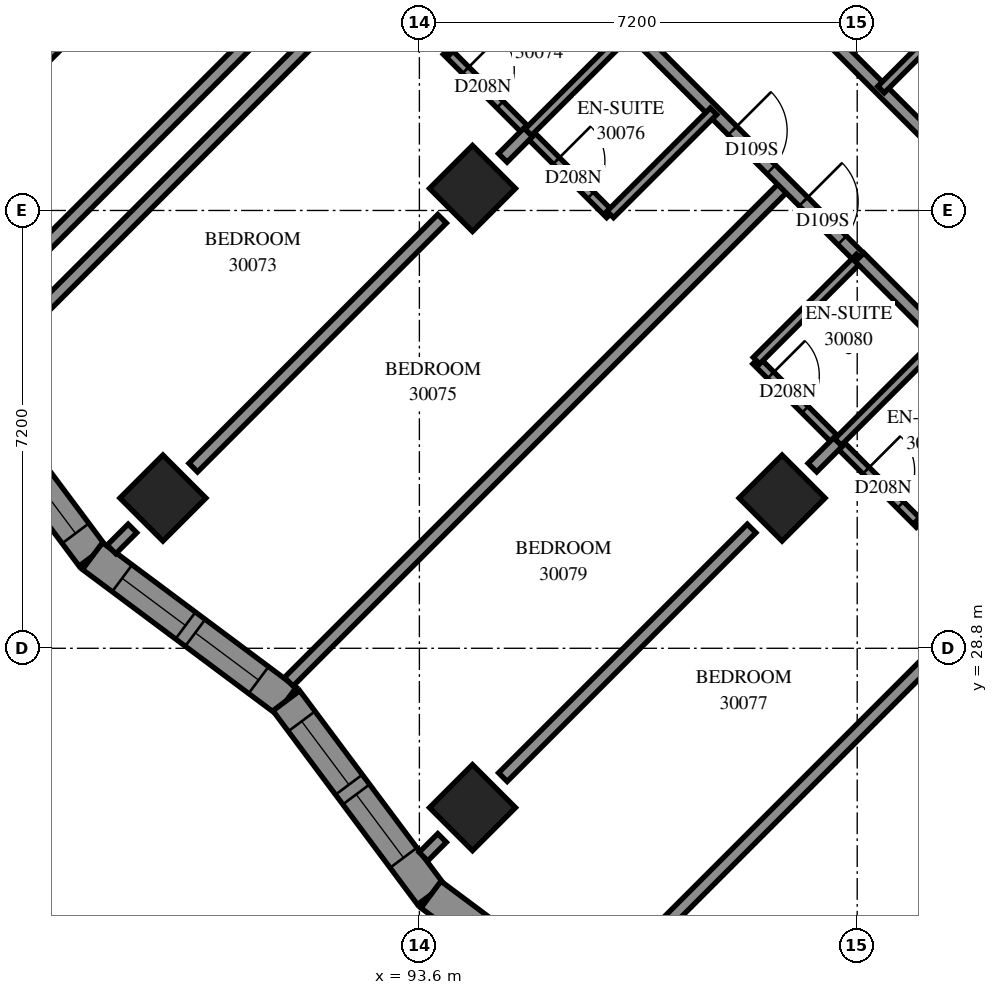
"""IFC4 building model, lengths in metres.
Left out: names, types, materials, properties, quantities, classifications, styles, units other than length and angle.
Written with IfcOpenShell. Run it as: python <this file> out.ifc"""

import sys

from ifc_helpers import new_model, si_unit, direction, frame, frame_2d, origin, origin_2d, place, context, subcontext, project, spatial, polyline, rectangle, outline, extrude, element, fill, save


model = new_model("IFC4")
c1 = context("Model", 3, precision=1e-05, world=origin(), true_north=direction((0.0, 1.0)))
c2 = subcontext(c1, "Body", "Model", "MODEL_VIEW")
j1 = project(units=[si_unit("LENGTHUNIT", "METRE"), si_unit("PLANEANGLEUNIT", "RADIAN")], contexts=[c1])
p1 = place(None, origin())
s1 = spatial("IfcSite", under=j1, at=p1, CompositionType="ELEMENT")
p2 = place(p1, origin())
s2 = spatial("IfcBuilding", under=s1, at=p2, CompositionType="ELEMENT")
p3 = place(p2, frame((0.0, 0.0, 111.8)))
s3 = spatial("IfcBuildingStorey", under=s2, at=p3, CompositionType="ELEMENT", Elevation=111.8)
for number, where, z_axis, x_axis in (
    (1, (94.474, 36.362, 0.0), (0.0, 0.0, 1.0), (0.707, -0.707, 0.0)),
    (2, (89.382, 31.271, 0.0), (0.0, 0.0, 1.0), (0.707, -0.707, 0.0)),
    (3, (99.565, 31.271, 0.0), (0.0, 0.0, 1.0), (0.707, -0.707, 0.0)),
    (4, (94.474, 26.18, 0.0), (0.0, 0.0, 1.0), (0.707, -0.707, 0.0)),
):
    element("IfcColumn", number, at=place(p3, frame(where, z_axis=z_axis, x_axis=x_axis)), inside=s3, PredefinedType="COLUMN", context=c2, shape_type="SweptSolid", body=[
        extrude(rectangle(XDim=1.0, YDim=1.0, at=origin_2d()), origin(), (0.0, 0.0, 1.0), 3.1),
    ])
p4 = place(p3, frame((87.12, 38.625, -0.3), z_axis=(0.0, 0.0, 1.0), x_axis=(0.7071067812, 0.7071067812, 0.0)))
e5 = element("IfcWall", 5, at=p4, inside=s3, PredefinedType="SHEAR", context=c2, shape_type="SweptSolid", body=[
    extrude(rectangle(XDim=14.4, YDim=0.8, at=frame_2d((7.2, 0.0))), origin(), (0.0, 0.0, 1.0), 2.7),
])
p5 = place(p4, frame((4.55, 0.0, 0.3)))
e6 = element("IfcOpeningElement", 6, at=p5, cuts=e5, PredefinedType="OPENING", context=c2, shape_type="SweptSolid", body=[
    extrude(rectangle(XDim=1.1, YDim=2.1, at=frame_2d((0.55, 1.05))), frame((0.0, 0.41, 0.0), z_axis=(0.0, -1.0, 0.0), x_axis=(1.0, 0.0, 0.0)), (0.0, 0.0, 1.0), 0.82),
])
p6 = place(p4, frame((11.35, 0.0, 0.3)))
e7 = element("IfcOpeningElement", 7, at=p6, cuts=e5, PredefinedType="OPENING", context=c2, shape_type="SweptSolid", body=[
    extrude(rectangle(XDim=1.1, YDim=2.1, at=frame_2d((0.55, 1.05))), frame((0.0, 0.41, 0.0), z_axis=(0.0, -1.0, 0.0), x_axis=(1.0, 0.0, 0.0)), (0.0, 0.0, 1.0), 0.82),
])
p7 = place(p3, frame((85.845, 33.504, 0.0), z_axis=(0.0, 0.0, 1.0), x_axis=(0.5980713977, -0.801442826, 0.0)))
e8 = element("IfcWall", 8, at=p7, inside=s3, PredefinedType="SOLIDWALL", context=c2, shape_type="SweptSolid", body=[
    extrude(outline(polyline([(0.04, -0.275), (4.017, -0.275), (3.937, 0.275), (-0.04, 0.275), (0.04, -0.275)])), origin(), (0.0, 0.0, 1.0), 3.1),
])
p8 = place(p7, frame((0.711, 0.0, 0.5)))
e9 = element("IfcOpeningElement", 9, at=p8, cuts=e8, PredefinedType="OPENING", context=c2, shape_type="SweptSolid", body=[
    extrude(rectangle(XDim=1.3, YDim=2.45, at=frame_2d((0.65, 1.225))), frame((0.0, 0.285, 0.0), z_axis=(0.0, -1.0, 0.0), x_axis=(1.0, 0.0, 0.0)), (0.0, 0.0, 1.0), 0.57),
])
p9 = place(p7, frame((2.211, 0.0, 0.5)))
e10 = element("IfcOpeningElement", 10, at=p9, cuts=e8, PredefinedType="OPENING", context=c2, shape_type="SweptSolid", body=[
    extrude(rectangle(XDim=1.3, YDim=2.45, at=frame_2d((0.65, 1.225))), frame((0.0, 0.285, 0.0), z_axis=(0.0, -1.0, 0.0), x_axis=(1.0, 0.0, 0.0)), (0.0, 0.0, 1.0), 0.57),
])
p10 = place(p3, frame((88.224, 30.316, 0.0), z_axis=(0.0, 0.0, 1.0), x_axis=(0.8014458841, -0.5980672997, 0.0)))
e11 = element("IfcWall", 11, at=p10, inside=s3, PredefinedType="SOLIDWALL", context=c2, shape_type="SweptSolid", body=[
    extrude(outline(polyline([(-0.04, -0.275), (3.937, -0.275), (4.017, 0.275), (0.04, 0.275), (-0.04, -0.275)])), origin(), (0.0, 0.0, 1.0), 3.1),
])
p11 = place(p10, frame((0.609, 0.0, 0.5)))
e12 = element("IfcOpeningElement", 12, at=p11, cuts=e11, PredefinedType="OPENING", context=c2, shape_type="SweptSolid", body=[
    extrude(rectangle(XDim=1.3, YDim=2.45, at=frame_2d((0.65, 1.225))), frame((0.0, 0.285, 0.0), z_axis=(0.0, -1.0, 0.0), x_axis=(1.0, 0.0, 0.0)), (0.0, 0.0, 1.0), 0.57),
])
p12 = place(p10, frame((2.109, 0.0, 0.5)))
e13 = element("IfcOpeningElement", 13, at=p12, cuts=e11, PredefinedType="OPENING", context=c2, shape_type="SweptSolid", body=[
    extrude(rectangle(XDim=1.3, YDim=2.45, at=frame_2d((0.65, 1.225))), frame((0.0, 0.285, 0.0), z_axis=(0.0, -1.0, 0.0), x_axis=(1.0, 0.0, 0.0)), (0.0, 0.0, 1.0), 0.57),
])
p13 = place(p3, frame((91.412, 27.937, 0.0), z_axis=(0.0, 0.0, 1.0), x_axis=(0.5980672997, -0.8014458841, 0.0)))
e14 = element("IfcWall", 14, at=p13, inside=s3, PredefinedType="SOLIDWALL", context=c2, shape_type="SweptSolid", body=[
    extrude(outline(polyline([(0.04, -0.275), (4.017, -0.275), (3.937, 0.275), (-0.04, 0.275), (0.04, -0.275)])), origin(), (0.0, 0.0, 1.0), 3.1),
])
p14 = place(p13, frame((0.422, 0.0, 0.5)))
e15 = element("IfcOpeningElement", 15, at=p14, cuts=e14, PredefinedType="OPENING", context=c2, shape_type="SweptSolid", body=[
    extrude(rectangle(XDim=1.3, YDim=2.45, at=frame_2d((0.65, 1.225))), frame((0.0, 0.285, 0.0), z_axis=(0.0, -1.0, 0.0), x_axis=(1.0, 0.0, 0.0)), (0.0, 0.0, 1.0), 0.57),
])
p15 = place(p13, frame((1.922, 0.0, 0.5)))
e16 = element("IfcOpeningElement", 16, at=p15, cuts=e14, PredefinedType="OPENING", context=c2, shape_type="SweptSolid", body=[
    extrude(rectangle(XDim=1.3, YDim=2.45, at=frame_2d((0.65, 1.225))), frame((0.0, 0.285, 0.0), z_axis=(0.0, -1.0, 0.0), x_axis=(1.0, 0.0, 0.0)), (0.0, 0.0, 1.0), 0.57),
])
p16 = place(p3, frame((93.79, 24.75, 0.0), z_axis=(0.0, 0.0, 1.0), x_axis=(0.8014443864, -0.5980693066, 0.0)))
e17 = element("IfcWall", 17, at=p16, inside=s3, PredefinedType="SOLIDWALL", context=c2, shape_type="SweptSolid", body=[
    extrude(outline(polyline([(-0.04, -0.275), (3.937, -0.275), (4.059, 0.275), (0.04, 0.275), (-0.04, -0.275)])), origin(), (0.0, 0.0, 1.0), 3.1),
])
p17 = place(p16, frame((1.072, 0.0, 0.5)))
e18 = element("IfcOpeningElement", 18, at=p17, cuts=e17, PredefinedType="OPENING", context=c2, shape_type="SweptSolid", body=[
    extrude(rectangle(XDim=1.2, YDim=2.45, at=frame_2d((0.6, 1.225))), frame((0.0, 0.285, 0.0), z_axis=(0.0, -1.0, 0.0), x_axis=(1.0, 0.0, 0.0)), (0.0, 0.0, 1.0), 0.57),
])
p18 = place(p3, frame((96.474, 23.09, 0.0), z_axis=(0.0, 0.0, 1.0), x_axis=(0.7071067812, 0.7071067812, 0.0)))
e19 = element("IfcWall", 19, at=p18, inside=s3, PredefinedType="PARTITIONING", context=c2, shape_type="SweptSolid", body=[
    extrude(rectangle(XDim=11.67, YDim=0.2, at=frame_2d((5.835, 0.0))), origin(), (0.0, 0.0, 1.0), 3.1),
])
p19 = place(p3, frame((86.331, 33.312, 0.0), z_axis=(0.0, 0.0, 1.0), x_axis=(0.707102476, 0.7071110864, 0.0)))
e20 = element("IfcWall", 20, at=p19, inside=s3, PredefinedType="PARTITIONING", context=c2, shape_type="SweptSolid", body=[
    extrude(rectangle(XDim=11.614, YDim=0.2, at=frame_2d((5.807, 0.0))), origin(), (0.0, 0.0, 1.0), 3.1),
])
p20 = place(p3, frame((91.452, 28.25, 0.0), z_axis=(0.0, 0.0, 1.0), x_axis=(0.7071931897, 0.7070203621, 0.0)))
e21 = element("IfcWall", 21, at=p20, inside=s3, PredefinedType="PARTITIONING", context=c2, shape_type="SweptSolid", body=[
    extrude(rectangle(XDim=11.572, YDim=0.2, at=frame_2d((5.786, 0.0))), origin(), (0.0, 0.0, 1.0), 3.1),
])
p21 = place(p3, frame((86.835, 34.806, 0.0), z_axis=(0.0, 0.0, 1.0), x_axis=(0.7071067812, 0.7071067812, 0.0)))
e22 = element("IfcWall", 22, at=p21, inside=s3, PredefinedType="PARTITIONING", context=c2, shape_type="SweptSolid", body=[
    extrude(rectangle(XDim=10.201, YDim=0.2, at=frame_2d((5.1, 0.0))), origin(), (0.0, 0.0, 1.0), 3.1),
])
p22 = place(p21, frame((8.959, 0.0, 0.0)))
e23 = element("IfcOpeningElement", 23, at=p22, cuts=e22, PredefinedType="OPENING", context=c2, shape_type="SweptSolid", body=[
    extrude(rectangle(XDim=1.0, YDim=2.1, at=frame_2d((0.5, 1.05))), frame((0.0, 0.11, 0.0), z_axis=(0.0, -1.0, 0.0), x_axis=(1.0, 0.0, 0.0)), (0.0, 0.0, 1.0), 0.22),
])
p23 = place(p3, frame((94.047, 42.015, 0.0), z_axis=(0.0, 0.0, 1.0), x_axis=(0.7071067812, -0.7071067812, 0.0)))
e24 = element("IfcWall", 24, at=p23, inside=s3, PredefinedType="PARTITIONING", context=c2, shape_type="SweptSolid", body=[
    extrude(rectangle(XDim=9.6, YDim=0.2, at=frame_2d((4.8, 0.0))), origin(), (0.0, 0.0, 1.0), 3.1),
])
p24 = place(p23, frame((1.099, 0.0, 0.0)))
e25 = element("IfcOpeningElement", 25, at=p24, cuts=e24, PredefinedType="OPENING", context=c2, shape_type="SweptSolid", body=[
    extrude(rectangle(XDim=0.9, YDim=2.1, at=frame_2d((0.45, 1.05))), frame((0.0, 0.11, 0.0), z_axis=(0.0, -1.0, 0.0), x_axis=(1.0, 0.0, 0.0)), (0.0, 0.0, 1.0), 0.22),
])
p25 = place(p23, frame((6.649, 0.0, 0.0)))
e26 = element("IfcOpeningElement", 26, at=p25, cuts=e24, PredefinedType="OPENING", context=c2, shape_type="SweptSolid", body=[
    extrude(rectangle(XDim=0.9, YDim=2.1, at=frame_2d((0.45, 1.05))), frame((0.0, 0.11, 0.0), z_axis=(0.0, -1.0, 0.0), x_axis=(1.0, 0.0, 0.0)), (0.0, 0.0, 1.0), 0.22),
])
p26 = place(p23, frame((8.3, 0.0, 0.0)))
e27 = element("IfcOpeningElement", 27, at=p26, cuts=e24, PredefinedType="OPENING", context=c2, shape_type="SweptSolid", body=[
    extrude(rectangle(XDim=0.9, YDim=2.1, at=frame_2d((0.45, 1.05))), frame((0.0, 0.11, 0.0), z_axis=(0.0, -1.0, 0.0), x_axis=(1.0, 0.0, 0.0)), (0.0, 0.0, 1.0), 0.22),
])
p27 = place(p3, frame((96.103, 43.083, 0.0), z_axis=(0.0, 0.0, 1.0), x_axis=(0.7071067812, -0.7071067812, 0.0)))
e28 = element("IfcWall", 28, at=p27, inside=s3, PredefinedType="PARTITIONING", context=c2, shape_type="SweptSolid", body=[
    extrude(rectangle(XDim=8.491, YDim=0.2, at=frame_2d((4.245, 0.0))), origin(), (0.0, 0.0, 1.0), 3.1),
])
p28 = place(p27, frame((1.995, 0.0, 0.0)))
e29 = element("IfcOpeningElement", 29, at=p28, cuts=e28, PredefinedType="OPENING", context=c2, shape_type="SweptSolid", body=[
    extrude(rectangle(XDim=0.9, YDim=2.1, at=frame_2d((0.45, 1.05))), frame((0.0, 0.11, 0.0), z_axis=(0.0, -1.0, 0.0), x_axis=(1.0, 0.0, 0.0)), (0.0, 0.0, 1.0), 0.22),
])
p29 = place(p27, frame((4.27, 0.0, 0.0)))
e30 = element("IfcOpeningElement", 30, at=p29, cuts=e28, PredefinedType="OPENING", context=c2, shape_type="SweptSolid", body=[
    extrude(rectangle(XDim=0.9, YDim=2.1, at=frame_2d((0.45, 1.05))), frame((0.0, 0.11, 0.0), z_axis=(0.0, -1.0, 0.0), x_axis=(1.0, 0.0, 0.0)), (0.0, 0.0, 1.0), 0.22),
])
p30 = place(p3, frame((89.881, 31.771, 0.0), z_axis=(0.0, 0.0, 1.0), x_axis=(0.7071067812, 0.7071067812, 0.0)))
e31 = element("IfcWall", 31, at=p30, inside=s3, PredefinedType="PARTITIONING", context=c2, shape_type="SweptSolid", body=[
    extrude(rectangle(XDim=5.787, YDim=0.2, at=frame_2d((2.893, 0.0))), origin(), (0.0, 0.0, 1.0), 3.1),
])
p31 = place(p3, frame((100.063, 21.589, 0.0), z_axis=(0.0, 0.0, 1.0), x_axis=(0.7071067812, 0.7071067812, 0.0)))
e32 = element("IfcWall", 32, at=p31, inside=s3, PredefinedType="PARTITIONING", context=c2, shape_type="SweptSolid", body=[
    extrude(rectangle(XDim=5.787, YDim=0.2, at=frame_2d((2.893, 0.0))), origin(), (0.0, 0.0, 1.0), 2.6),
])
p32 = place(p3, frame((94.973, 26.681, 0.0), z_axis=(0.0, 0.0, 1.0), x_axis=(0.7071067812, 0.7071067812, 0.0)))
e33 = element("IfcWall", 33, at=p32, inside=s3, PredefinedType="PARTITIONING", context=c2, shape_type="SweptSolid", body=[
    extrude(rectangle(XDim=5.784, YDim=0.2, at=frame_2d((2.892, 0.0))), origin(), (0.0, 0.0, 1.0), 3.1),
])
p33 = place(p3, frame((99.137, 33.531, 0.0), z_axis=(0.0, 0.0, 1.0), x_axis=(0.7071067812, -0.7071067812, 0.0)))
e34 = element("IfcWall", 34, at=p33, inside=s3, PredefinedType="PARTITIONING", context=c2, shape_type="SweptSolid", body=[
    extrude(rectangle(XDim=3.801, YDim=0.15, at=frame_2d((1.901, 0.0))), origin(), (0.0, 0.0, 1.0), 3.1),
])
p34 = place(p33, frame((2.557, 0.0, 0.0)))
e35 = element("IfcOpeningElement", 35, at=p34, cuts=e34, PredefinedType="OPENING", context=c2, shape_type="SweptSolid", body=[
    extrude(rectangle(XDim=0.8, YDim=2.1, at=frame_2d((0.4, 1.05))), frame((0.0, 0.085, 0.0), z_axis=(0.0, -1.0, 0.0), x_axis=(1.0, 0.0, 0.0)), (0.0, 0.0, 1.0), 0.17),
])
p35 = place(p33, frame((0.339, 0.0, 0.0)))
e36 = element("IfcOpeningElement", 36, at=p35, cuts=e34, PredefinedType="OPENING", context=c2, shape_type="SweptSolid", body=[
    extrude(rectangle(XDim=0.8, YDim=2.1, at=frame_2d((0.4, 1.05))), frame((0.0, 0.085, 0.0), z_axis=(0.0, -1.0, 0.0), x_axis=(1.0, 0.0, 0.0)), (0.0, 0.0, 1.0), 0.17),
])
p36 = place(p3, frame((94.047, 38.621, 0.0), z_axis=(0.0, 0.0, 1.0), x_axis=(0.7071067812, -0.7071067812, 0.0)))
e37 = element("IfcWall", 37, at=p36, inside=s3, PredefinedType="PARTITIONING", context=c2, shape_type="SweptSolid", body=[
    extrude(rectangle(XDim=3.799, YDim=0.15, at=frame_2d((1.899, 0.0))), origin(), (0.0, 0.0, 1.0), 3.1),
])
p37 = place(p36, frame((0.444, 0.0, 0.0)))
e38 = element("IfcOpeningElement", 38, at=p37, cuts=e37, PredefinedType="OPENING", context=c2, shape_type="SweptSolid", body=[
    extrude(rectangle(XDim=0.8, YDim=2.1, at=frame_2d((0.4, 1.05))), frame((0.0, 0.085, 0.0), z_axis=(0.0, -1.0, 0.0), x_axis=(1.0, 0.0, 0.0)), (0.0, 0.0, 1.0), 0.17),
])
p38 = place(p36, frame((2.551, 0.0, 0.0)))
e39 = element("IfcOpeningElement", 39, at=p38, cuts=e37, PredefinedType="OPENING", context=c2, shape_type="SweptSolid", body=[
    extrude(rectangle(XDim=0.8, YDim=2.1, at=frame_2d((0.4, 1.05))), frame((0.0, 0.085, 0.0), z_axis=(0.0, -1.0, 0.0), x_axis=(1.0, 0.0, 0.0)), (0.0, 0.0, 1.0), 0.17),
])
for number, where, z_axis, x_axis in (
    (40, (101.192, 37.988, 0.0), (0.0, 0.0, 1.0), (0.707, 0.708, 0.0)),
    (41, (95.389, 37.285, 0.0), (0.0, 0.0, 1.0), (0.708, 0.707, 0.0)),
    (42, (94.052, 38.622, 0.0), (0.0, 0.0, 1.0), (0.707, 0.708, 0.0)),
    (43, (96.739, 35.935, 0.0), (0.0, 0.0, 1.0), (0.708, 0.707, 0.0)),
    (44, (99.143, 33.531, 0.0), (0.0, 0.0, 1.0), (0.708, 0.707, 0.0)),
    (45, (101.83, 30.844, 0.0), (0.0, 0.0, 1.0), (0.707, 0.708, 0.0)),
):
    element("IfcWall", number, at=place(p3, frame(where, z_axis=z_axis, x_axis=x_axis)), inside=s3, PredefinedType="PARTITIONING", context=c2, shape_type="SweptSolid", body=[
        extrude(rectangle(XDim=2.4, YDim=0.15, at=frame_2d((1.2, 0.0))), origin(), (0.0, 0.0, 1.0), 3.1),
    ])
p39 = place(p3, frame((100.483, 32.191, 0.0), z_axis=(0.0, 0.0, 1.0), x_axis=(0.7071067812, 0.7071067812, 0.0)))
e46 = element("IfcWall", 46, at=p39, inside=s3, PredefinedType="PARTITIONING", context=c2, shape_type="SweptSolid", body=[
    extrude(rectangle(XDim=2.398, YDim=0.15, at=frame_2d((1.199, 0.0))), origin(), (0.0, 0.0, 1.0), 3.1),
])
p40 = place(p3, frame((100.839, 35.231, 0.0), z_axis=(0.0, 0.0, 1.0), x_axis=(0.7065800724, -0.7076330979, 0.0)))
e47 = element("IfcWall", 47, at=p40, inside=s3, PredefinedType="PARTITIONING", context=c2, shape_type="SweptSolid", body=[
    extrude(rectangle(XDim=1.899, YDim=0.2, at=frame_2d((0.95, 0.0))), origin(), (0.0, 0.0, 1.0), 3.1),
])
p41 = place(p3, frame((100.063, 31.771, 0.0), z_axis=(0.0, 0.0, 1.0), x_axis=(0.7071067812, 0.7071067812, 0.0)))
e48 = element("IfcWall", 48, at=p41, inside=s3, PredefinedType="PARTITIONING", context=c2, shape_type="SweptSolid", body=[
    extrude(rectangle(XDim=0.594, YDim=0.2, at=frame_2d((0.297, 0.0))), origin(), (0.0, 0.0, 1.0), 3.1),
])
p42 = place(p3, frame((94.971, 36.865, 0.0), z_axis=(0.0, 0.0, 1.0), x_axis=(0.7054171665, 0.7087923682, 0.0)))
e49 = element("IfcWall", 49, at=p42, inside=s3, PredefinedType="PARTITIONING", context=c2, shape_type="SweptSolid", body=[
    extrude(rectangle(XDim=0.593, YDim=0.2, at=frame_2d((0.296, 0.0))), origin(), (0.0, 0.0, 1.0), 3.1),
])
p43 = place(p3, frame((88.536, 30.426, 0.0), z_axis=(0.0, 0.0, 1.0), x_axis=(0.7071067812, 0.7071067812, 0.0)))
e50 = element("IfcWall", 50, at=p43, inside=s3, PredefinedType="PARTITIONING", context=c2, shape_type="SweptSolid", body=[
    extrude(rectangle(XDim=0.488, YDim=0.2, at=frame_2d((0.244, 0.0))), origin(), (0.0, 0.0, 1.0), 3.1),
])
p44 = place(p3, frame((93.667, 25.375, 0.0), z_axis=(0.0, 0.0, 1.0), x_axis=(0.7071067812, 0.7071067812, 0.0)))
e51 = element("IfcWall", 51, at=p44, inside=s3, PredefinedType="PARTITIONING", context=c2, shape_type="SweptSolid", body=[
    extrude(rectangle(XDim=0.433, YDim=0.2, at=frame_2d((0.216, 0.0))), origin(), (0.0, 0.0, 1.0), 3.1),
])
p45 = place(p9, origin())
e52 = element("IfcWindow", 52, at=p45, inside=s3, PartitioningType="SINGLE_PANEL", PredefinedType="WINDOW", context=c2, shape_type="SweptSolid", body=[
    extrude(rectangle(XDim=1.3, YDim=2.45, at=frame_2d((0.65, 1.225))), frame((0.0, 0.155, 0.0), z_axis=(0.0, -1.0, 0.0), x_axis=(1.0, 0.0, 0.0)), (0.0, 0.0, 1.0), 0.06),
])
fill(e10, e52)
p46 = place(p11, origin())
e53 = element("IfcWindow", 53, at=p46, inside=s3, PartitioningType="SINGLE_PANEL", PredefinedType="WINDOW", context=c2, shape_type="SweptSolid", body=[
    extrude(rectangle(XDim=1.3, YDim=2.45, at=frame_2d((0.65, 1.225))), frame((0.0, 0.155, 0.0), z_axis=(0.0, -1.0, 0.0), x_axis=(1.0, 0.0, 0.0)), (0.0, 0.0, 1.0), 0.06),
])
fill(e12, e53)
p47 = place(p12, origin())
e54 = element("IfcWindow", 54, at=p47, inside=s3, PartitioningType="SINGLE_PANEL", PredefinedType="WINDOW", context=c2, shape_type="SweptSolid", body=[
    extrude(rectangle(XDim=1.3, YDim=2.45, at=frame_2d((0.65, 1.225))), frame((0.0, 0.155, 0.0), z_axis=(0.0, -1.0, 0.0), x_axis=(1.0, 0.0, 0.0)), (0.0, 0.0, 1.0), 0.06),
])
fill(e13, e54)
p48 = place(p14, origin())
e55 = element("IfcWindow", 55, at=p48, inside=s3, PartitioningType="SINGLE_PANEL", PredefinedType="WINDOW", context=c2, shape_type="SweptSolid", body=[
    extrude(rectangle(XDim=1.3, YDim=2.45, at=frame_2d((0.65, 1.225))), frame((0.0, 0.155, 0.0), z_axis=(0.0, -1.0, 0.0), x_axis=(1.0, 0.0, 0.0)), (0.0, 0.0, 1.0), 0.06),
])
fill(e15, e55)
p49 = place(p15, origin())
e56 = element("IfcWindow", 56, at=p49, inside=s3, PartitioningType="SINGLE_PANEL", PredefinedType="WINDOW", context=c2, shape_type="SweptSolid", body=[
    extrude(rectangle(XDim=1.3, YDim=2.45, at=frame_2d((0.65, 1.225))), frame((0.0, 0.155, 0.0), z_axis=(0.0, -1.0, 0.0), x_axis=(1.0, 0.0, 0.0)), (0.0, 0.0, 1.0), 0.06),
])
fill(e16, e56)
p50 = place(p37, origin())
e57 = element("IfcDoor", 57, at=p50, inside=s3, OperationType="SINGLE_SWING_RIGHT", PredefinedType="DOOR", context=c2, shape_type="SweptSolid", body=[
    extrude(rectangle(XDim=0.8, YDim=2.1, at=frame_2d((0.4, 1.05))), frame((0.0, 0.025, 0.0), z_axis=(0.0, -1.0, 0.0), x_axis=(1.0, 0.0, 0.0)), (0.0, 0.0, 1.0), 0.05),
])
fill(e38, e57)
p51 = place(p25, origin())
e58 = element("IfcDoor", 58, at=p51, inside=s3, OperationType="SINGLE_SWING_RIGHT", PredefinedType="DOOR", context=c2, shape_type="SweptSolid", body=[
    extrude(rectangle(XDim=0.9, YDim=2.1, at=frame_2d((0.45, 1.05))), frame((0.0, 0.025, 0.0), z_axis=(0.0, -1.0, 0.0), x_axis=(1.0, 0.0, 0.0)), (0.0, 0.0, 1.0), 0.05),
])
fill(e26, e58)
p52 = place(p38, origin())
e59 = element("IfcDoor", 59, at=p52, inside=s3, OperationType="SINGLE_SWING_RIGHT", PredefinedType="DOOR", context=c2, shape_type="SweptSolid", body=[
    extrude(rectangle(XDim=0.8, YDim=2.1, at=frame_2d((0.4, 1.05))), frame((0.0, 0.025, 0.0), z_axis=(0.0, -1.0, 0.0), x_axis=(1.0, 0.0, 0.0)), (0.0, 0.0, 1.0), 0.05),
])
fill(e39, e59)
p53 = place(p34, origin())
e60 = element("IfcDoor", 60, at=p53, inside=s3, OperationType="SINGLE_SWING_RIGHT", PredefinedType="DOOR", context=c2, shape_type="SweptSolid", body=[
    extrude(rectangle(XDim=0.8, YDim=2.1, at=frame_2d((0.4, 1.05))), frame((0.0, 0.025, 0.0), z_axis=(0.0, -1.0, 0.0), x_axis=(1.0, 0.0, 0.0)), (0.0, 0.0, 1.0), 0.05),
])
fill(e35, e60)
p54 = place(p26, origin())
e61 = element("IfcDoor", 61, at=p54, inside=s3, OperationType="SINGLE_SWING_LEFT", PredefinedType="DOOR", context=c2, shape_type="SweptSolid", body=[
    extrude(rectangle(XDim=0.9, YDim=2.1, at=frame_2d((0.45, 1.05))), frame((0.0, 0.025, 0.0), z_axis=(0.0, -1.0, 0.0), x_axis=(1.0, 0.0, 0.0)), (0.0, 0.0, 1.0), 0.05),
])
fill(e27, e61)
p55 = place(p35, origin())
e62 = element("IfcDoor", 62, at=p55, inside=s3, OperationType="SINGLE_SWING_RIGHT", PredefinedType="DOOR", context=c2, shape_type="SweptSolid", body=[
    extrude(rectangle(XDim=0.8, YDim=2.1, at=frame_2d((0.4, 1.05))), frame((0.0, 0.025, 0.0), z_axis=(0.0, -1.0, 0.0), x_axis=(1.0, 0.0, 0.0)), (0.0, 0.0, 1.0), 0.05),
])
fill(e36, e62)
save(model, sys.argv[1])
